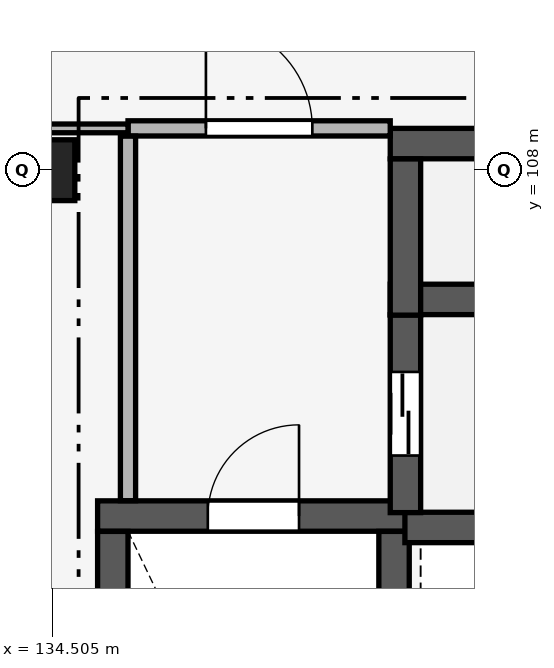
"""IFC4 building model, lengths in metres.
Left out: names, types, materials, properties, quantities, classifications, styles, units other than length and angle.
Written with IfcOpenShell. Run it as: python <this file> out.ifc"""

import sys

from ifc_helpers import new_model, si_unit, direction, frame, frame_2d, origin, origin_2d, place, context, subcontext, project, spatial, rectangle, extrude, element, fill, save


model = new_model("IFC4")
c1 = context("Model", 3, precision=1e-05, world=origin(), true_north=direction((0.0, 1.0)))
c2 = subcontext(c1, "Body", "Model", "MODEL_VIEW")
j1 = project(units=[si_unit("LENGTHUNIT", "METRE"), si_unit("PLANEANGLEUNIT", "RADIAN")], contexts=[c1])
p1 = place(None, origin())
s1 = spatial("IfcSite", under=j1, at=p1, CompositionType="ELEMENT")
p2 = place(p1, origin())
s2 = spatial("IfcBuilding", under=s1, at=p2, CompositionType="ELEMENT")
p3 = place(p2, frame((0.0, 0.0, 20.4)))
s3 = spatial("IfcBuildingStorey", under=s2, at=p3, CompositionType="ELEMENT", Elevation=20.4)
p4 = place(p3, frame((134.4, 108.0, 0.0), z_axis=(0.0, 0.0, 1.0), x_axis=(1.0, 0.0, 0.0)))
e1 = element("IfcColumn", 1, at=p4, inside=s3, PredefinedType="COLUMN", context=c2, shape_type="SweptSolid", body=[
    extrude(rectangle(XDim=0.8, YDim=0.8, at=origin_2d()), origin(), (0.0, 0.0, 1.0), 4.8),
])
p5 = place(p3, frame((135.1, 103.45, 0.0), z_axis=(0.0, 0.0, 1.0), x_axis=(1.0, 0.0, 0.0)))
e2 = element("IfcWall", 2, at=p5, inside=s3, PredefinedType="SHEAR", context=c2, shape_type="SweptSolid", body=[
    extrude(rectangle(XDim=4.1, YDim=0.4, at=frame_2d((2.05, 0.0))), origin(), (0.0, 0.0, 1.0), 4.55),
])
p6 = place(p5, frame((1.45, 0.0, 0.0)))
e3 = element("IfcOpeningElement", 3, at=p6, cuts=e2, PredefinedType="OPENING", context=c2, shape_type="SweptSolid", body=[
    extrude(rectangle(XDim=1.2, YDim=2.2, at=frame_2d((0.6, 1.1))), frame((0.0, 0.215, 0.0), z_axis=(0.0, -1.0, 0.0), x_axis=(1.0, 0.0, 0.0)), (0.0, 0.0, 1.0), 0.43),
])
for number, where, z_axis, x_axis in (
    (4, (135.3, 96.352, 0.0), (0.0, 0.0, 1.0), (0.0, 1.0, 0.0)),
    (5, (139.0, 96.352, 0.0), (0.0, 0.0, 1.0), (0.0, 1.0, 0.0)),
):
    element("IfcWall", number, at=place(p3, frame(where, z_axis=z_axis, x_axis=x_axis)), inside=s3, PredefinedType="SHEAR", context=c2, shape_type="SweptSolid", body=[
        extrude(rectangle(XDim=6.896, YDim=0.4, at=frame_2d((3.448, 0.0))), origin(), (0.0, 0.0, 1.0), 4.55),
    ])
p7 = place(p3, frame((139.143, 103.3, 0.0), z_axis=(0.0, 0.0, 1.0), x_axis=(1.0, 0.0, 0.0)))
e6 = element("IfcWall", 6, at=p7, inside=s3, PredefinedType="SHEAR", context=c2, shape_type="SweptSolid", body=[
    extrude(rectangle(XDim=3.007, YDim=0.4, at=frame_2d((1.503, 0.0))), origin(), (0.0, 0.0, 1.0), 4.55),
])
p8 = place(p3, frame((138.95, 106.3, 0.0), z_axis=(0.0, 0.0, 1.0), x_axis=(1.0, 0.0, 0.0)))
e7 = element("IfcWall", 7, at=p8, inside=s3, PredefinedType="SHEAR", context=c2, shape_type="SweptSolid", body=[
    extrude(rectangle(XDim=3.2, YDim=0.4, at=frame_2d((1.6, 0.0))), origin(), (0.0, 0.0, 1.0), 4.55),
])
p9 = place(p3, frame((139.15, 103.495, 0.0), z_axis=(0.0, 0.0, 1.0), x_axis=(0.0, 1.0, 0.0)))
e8 = element("IfcWall", 8, at=p9, inside=s3, PredefinedType="SHEAR", context=c2, shape_type="SweptSolid", body=[
    extrude(rectangle(XDim=2.603, YDim=0.4, at=frame_2d((1.301, 0.0))), origin(), (0.0, 0.0, 1.0), 4.55),
])
p10 = place(p9, frame((0.751, 0.0, 0.0)))
e9 = element("IfcOpeningElement", 9, at=p10, cuts=e8, PredefinedType="OPENING", context=c2, shape_type="SweptSolid", body=[
    extrude(rectangle(XDim=1.1, YDim=2.15, at=frame_2d((0.55, 1.075))), frame((0.0, 0.215, 0.0), z_axis=(0.0, -1.0, 0.0), x_axis=(1.0, 0.0, 0.0)), (0.0, 0.0, 1.0), 0.43),
])
p11 = place(p3, frame((138.95, 108.35, 0.0), z_axis=(0.0, 0.0, 1.0), x_axis=(1.0, 0.0, 0.0)))
e10 = element("IfcWall", 10, at=p11, inside=s3, PredefinedType="SHEAR", context=c2, shape_type="SweptSolid", body=[
    extrude(rectangle(XDim=3.455, YDim=0.4, at=frame_2d((1.728, 0.0))), origin(), (0.0, 0.0, 1.0), 4.55),
])
p12 = place(p11, frame((1.178, 0.0, 0.0)))
e11 = element("IfcOpeningElement", 11, at=p12, cuts=e10, PredefinedType="OPENING", context=c2, shape_type="SweptSolid", body=[
    extrude(rectangle(XDim=1.1, YDim=2.15, at=frame_2d((0.55, 1.075))), frame((0.0, 0.215, 0.0), z_axis=(0.0, -1.0, 0.0), x_axis=(1.0, 0.0, 0.0)), (0.0, 0.0, 1.0), 0.43),
])
p13 = place(p3, frame((139.15, 106.093, 0.0), z_axis=(0.0, 0.0, 1.0), x_axis=(0.0, 1.0, 0.0)))
e12 = element("IfcWall", 12, at=p13, inside=s3, PredefinedType="SHEAR", context=c2, shape_type="SweptSolid", body=[
    extrude(rectangle(XDim=2.055, YDim=0.4, at=frame_2d((1.027, 0.0))), origin(), (0.0, 0.0, 1.0), 4.55),
])
p14 = place(p3, frame((135.5, 108.55, 0.0), z_axis=(0.0, 0.0, 1.0), x_axis=(1.0, 0.0, 0.0)))
e13 = element("IfcWall", 13, at=p14, inside=s3, PredefinedType="PARTITIONING", context=c2, shape_type="SweptSolid", body=[
    extrude(rectangle(XDim=3.45, YDim=0.2, at=frame_2d((1.725, 0.0))), origin(), (0.0, 0.0, 1.0), 4.55),
])
p15 = place(p14, frame((1.025, 0.0, 0.0)))
e14 = element("IfcOpeningElement", 14, at=p15, cuts=e13, PredefinedType="OPENING", context=c2, shape_type="SweptSolid", body=[
    extrude(rectangle(XDim=1.4, YDim=2.2, at=frame_2d((0.7, 1.1))), frame((0.0, 0.115, 0.0), z_axis=(0.0, -1.0, 0.0), x_axis=(1.0, 0.0, 0.0)), (0.0, 0.0, 1.0), 0.23),
])
p16 = place(p3, frame((134.27, 108.55, 0.0), z_axis=(0.0, 0.0, 1.0), x_axis=(1.0, 0.0, 0.0)))
e15 = element("IfcWall", 15, at=p16, inside=s3, PredefinedType="PARTITIONING", context=c2, shape_type="SweptSolid", body=[
    extrude(rectangle(XDim=1.23, YDim=0.115, at=frame_2d((0.615, 0.0))), origin(), (0.0, 0.0, 1.0), 4.0),
])
p17 = place(p3, frame((135.5, 103.652, 0.0), z_axis=(0.0, 0.0, 1.0), x_axis=(0.0, 1.0, 0.0)))
e16 = element("IfcWall", 16, at=p17, inside=s3, PredefinedType="PARTITIONING", context=c2, shape_type="SweptSolid", body=[
    extrude(rectangle(XDim=4.796, YDim=0.2, at=frame_2d((2.398, 0.0))), origin(), (0.0, 0.0, 1.0), 4.55),
])
p18 = place(p6, origin())
e17 = element("IfcDoor", 17, at=p18, inside=s3, OperationType="SINGLE_SWING_RIGHT", PredefinedType="DOOR", context=c2, shape_type="SweptSolid", body=[
    extrude(rectangle(XDim=1.2, YDim=2.2, at=frame_2d((0.6, 1.1))), frame((0.0, 0.025, 0.0), z_axis=(0.0, -1.0, 0.0), x_axis=(1.0, 0.0, 0.0)), (0.0, 0.0, 1.0), 0.05),
])
fill(e3, e17)
p19 = place(p10, origin())
e18 = element("IfcDoor", 18, at=p19, inside=s3, OperationType="DOUBLE_DOOR_SLIDING", PredefinedType="DOOR", context=c2, shape_type="SweptSolid", body=[
    extrude(rectangle(XDim=1.1, YDim=2.15, at=frame_2d((0.55, 1.075))), frame((0.0, 0.025, 0.0), z_axis=(0.0, -1.0, 0.0), x_axis=(1.0, 0.0, 0.0)), (0.0, 0.0, 1.0), 0.05),
])
fill(e9, e18)
p20 = place(p15, origin())
e19 = element("IfcDoor", 19, at=p20, inside=s3, OperationType="SINGLE_SWING_LEFT", PredefinedType="DOOR", context=c2, shape_type="SweptSolid", body=[
    extrude(rectangle(XDim=1.4, YDim=2.2, at=frame_2d((0.7, 1.1))), frame((0.0, 0.025, 0.0), z_axis=(0.0, -1.0, 0.0), x_axis=(1.0, 0.0, 0.0)), (0.0, 0.0, 1.0), 0.05),
])
fill(e14, e19)
save(model, sys.argv[1])
